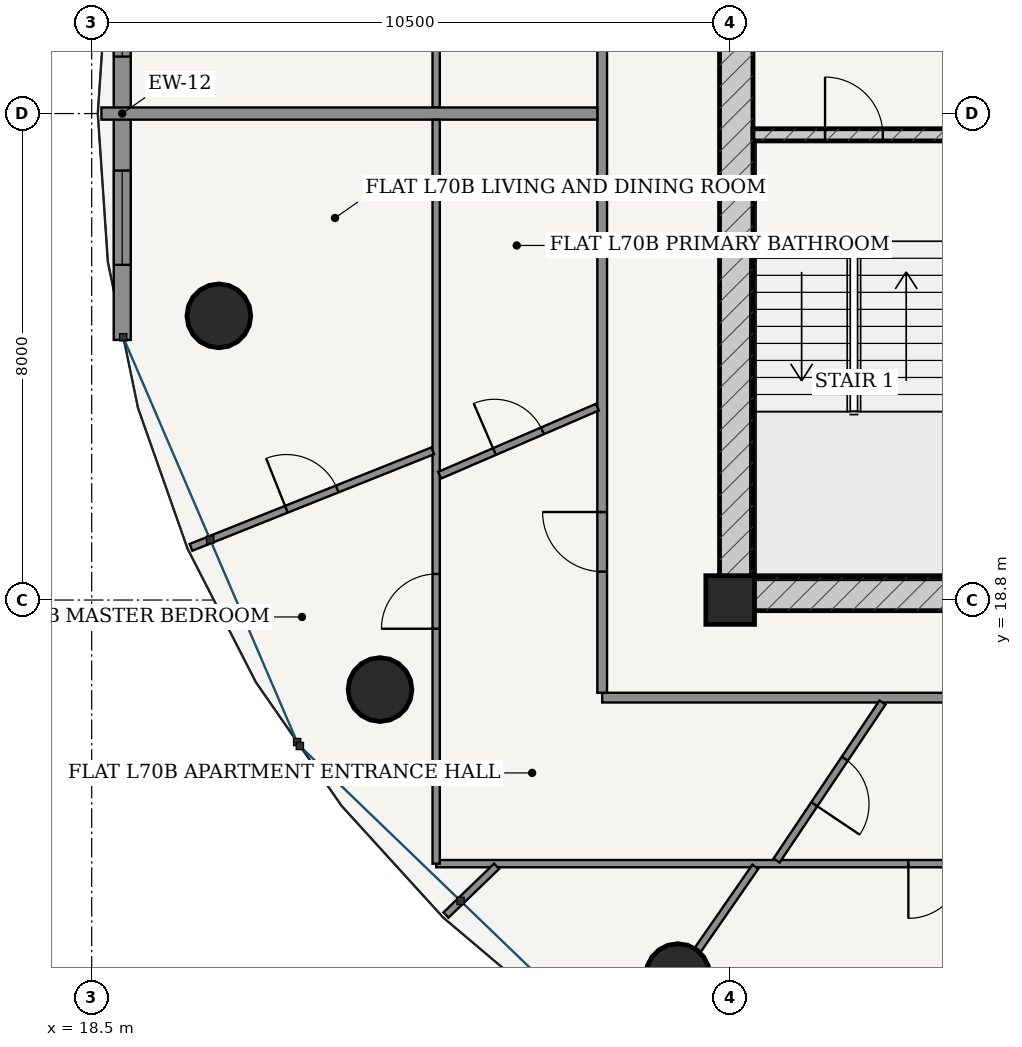
"""IFC4 building model, lengths in metres.
Left out: names, types, materials, properties, quantities, classifications, styles, units other than length and angle.
Written with IfcOpenShell. Run it as: python <this file> out.ifc"""

import sys

from ifc_helpers import new_model, si_unit, direction, frame, frame_2d, origin, origin_2d, place, context, subcontext, project, spatial, rectangle, hollow_circle, extrude, source, transform, mapped, element, fill, save


model = new_model("IFC4")
c1 = context("Model", 3, precision=1e-05, world=origin(), true_north=direction((-0.2419218956, 0.970295726276)))
c2 = subcontext(c1, "Body", "Model", "MODEL_VIEW")
j1 = project(units=[si_unit("LENGTHUNIT", "METRE"), si_unit("PLANEANGLEUNIT", "RADIAN")], contexts=[c1])
p1 = place(None, origin())
s1 = spatial("IfcSite", under=j1, at=p1, CompositionType="ELEMENT")
p2 = place(p1, origin())
s2 = spatial("IfcBuilding", under=s1, at=p2, CompositionType="ELEMENT")
p3 = place(p2, frame((0.0, 0.0, 266.95)))
s3 = spatial("IfcBuildingStorey", under=s2, at=p3, CompositionType="ELEMENT", Elevation=266.95)
p4 = place(p3, frame((29.0, 18.8, 0.0), z_axis=(0.0, 0.0, 1.0), x_axis=(1.0, 0.0, 0.0)))
e1 = element("IfcColumn", 1, at=p4, inside=s3, PredefinedType="COLUMN", context=c2, shape_type="SweptSolid", body=[
    extrude(rectangle(XDim=0.8, YDim=0.8, at=origin_2d()), origin(), (0.0, 0.0, 1.0), 3.75),
])
p5 = place(p3, frame((28.825, 18.9, 0.0), z_axis=(0.0, 0.0, 1.0), x_axis=(1.0, 0.0, 0.0)))
e2 = element("IfcWall", 2, at=p5, inside=s3, PredefinedType="SHEAR", context=c2, shape_type="SweptSolid", body=[
    extrude(rectangle(XDim=18.35, YDim=0.55, at=frame_2d((9.175, 0.0))), origin(), (0.0, 0.0, 1.0), 3.49),
])
p6 = place(p5, frame((8.75, 0.0, 0.0)))
e3 = element("IfcOpeningElement", 3, at=p6, cuts=e2, PredefinedType="OPENING", context=c2, shape_type="SweptSolid", body=[
    extrude(rectangle(XDim=0.85, YDim=2.1, at=frame_2d((0.425, 1.05))), frame((0.0, 0.285, 0.0), z_axis=(0.0, -1.0, 0.0), x_axis=(1.0, 0.0, 0.0)), (0.0, 0.0, 1.0), 0.57),
])
p7 = place(p3, frame((29.1, 19.175, 0.0), z_axis=(0.0, 0.0, 1.0), x_axis=(0.0, 1.0, 0.0)))
e4 = element("IfcWall", 4, at=p7, inside=s3, PredefinedType="SHEAR", context=c2, shape_type="SweptSolid", body=[
    extrude(rectangle(XDim=15.25, YDim=0.55, at=frame_2d((7.625, 0.0))), origin(), (0.0, 0.0, 1.0), 3.49),
])
p8 = place(p7, frame((9.875, 0.0, 0.0)))
e5 = element("IfcOpeningElement", 5, at=p8, cuts=e4, PredefinedType="OPENING", context=c2, shape_type="SweptSolid", body=[
    extrude(rectangle(XDim=1.5, YDim=2.2, at=frame_2d((0.75, 1.1))), frame((0.0, 0.285, 0.0), z_axis=(0.0, -1.0, 0.0), x_axis=(1.0, 0.0, 0.0)), (0.0, 0.0, 1.0), 0.57),
])
p9 = place(p3, frame((29.375, 26.45, 0.0), z_axis=(0.0, 0.0, 1.0), x_axis=(1.0, 0.0, 0.0)))
e6 = element("IfcWall", 6, at=p9, inside=s3, PredefinedType="SOLIDWALL", context=c2, shape_type="SweptSolid", body=[
    extrude(rectangle(XDim=3.32, YDim=0.2, at=frame_2d((1.66, 0.0))), origin(), (0.0, 0.0, 1.0), 3.49),
])
p10 = place(p9, frame((1.185, 0.0, 0.0)))
e7 = element("IfcOpeningElement", 7, at=p10, cuts=e6, PredefinedType="OPENING", context=c2, shape_type="SweptSolid", body=[
    extrude(rectangle(XDim=0.95, YDim=2.15, at=frame_2d((0.475, 1.075))), frame((0.0, 0.11, 0.0), z_axis=(0.0, -1.0, 0.0), x_axis=(1.0, 0.0, 0.0)), (0.0, 0.0, 1.0), 0.22),
])
for number, where, z_axis, x_axis in (
    (8, (20.591, 23.474, 0.0), (0.0, 0.0, 1.0), (1.0, 0.0, 0.0)),
    (9, (23.241, 17.328, 0.0), (0.0, 0.0, 1.0), (1.0, 0.0, 0.0)),
    (10, (28.139, 12.624, 0.0), (0.0, 0.0, 1.0), (1.0, 0.0, 0.0)),
):
    element("IfcColumn", number, at=place(p3, frame(where, z_axis=z_axis, x_axis=x_axis)), inside=s3, PredefinedType="COLUMN", context=c2, shape_type="SweptSolid", body=[
        extrude(hollow_circle(Radius=0.525, WallThickness=0.035, at=origin_2d()), origin(), (0.0, 0.0, 1.0), 3.75),
    ])
p11 = place(p3, frame((19.002, 30.522, 0.0), z_axis=(0.0, 0.0, 1.0), x_axis=(0.0, -1.0, 0.0)))
e11 = element("IfcWall", 11, at=p11, inside=s3, PredefinedType="SOLIDWALL", context=c2, shape_type="SweptSolid", body=[
    extrude(rectangle(XDim=7.445, YDim=0.28, at=frame_2d((3.722, 0.0))), origin(), (0.0, 0.0, 1.0), 3.49),
])
p12 = place(p11, frame((1.235, 0.0, 0.85)))
e12 = element("IfcOpeningElement", 12, at=p12, cuts=e11, PredefinedType="OPENING", context=c2, shape_type="SweptSolid", body=[
    extrude(rectangle(XDim=1.55, YDim=1.95, at=frame_2d((0.775, 0.975))), frame((0.0, 0.15, 0.0), z_axis=(0.0, -1.0, 0.0), x_axis=(1.0, 0.0, 0.0)), (0.0, 0.0, 1.0), 0.3),
])
p13 = place(p11, frame((4.66, 0.0, 0.85)))
e13 = element("IfcOpeningElement", 13, at=p13, cuts=e11, PredefinedType="OPENING", context=c2, shape_type="SweptSolid", body=[
    extrude(rectangle(XDim=1.55, YDim=1.95, at=frame_2d((0.775, 0.975))), frame((0.0, 0.15, 0.0), z_axis=(0.0, -1.0, 0.0), x_axis=(1.0, 0.0, 0.0)), (0.0, 0.0, 1.0), 0.3),
])
p14 = place(p3, frame((26.895, 17.195, 0.0), z_axis=(0.0, 0.0, 1.0), x_axis=(1.0, 0.0, 0.0)))
e14 = element("IfcWall", 14, at=p14, inside=s3, PredefinedType="PARTITIONING", context=c2, shape_type="SweptSolid", body=[
    extrude(rectangle(XDim=22.21, YDim=0.16, at=frame_2d((11.105, 0.0))), origin(), (0.0, 0.0, 1.0), 3.015),
])
p15 = place(p3, frame((26.895, 17.275, 0.0), z_axis=(0.0, 0.0, 1.0), x_axis=(0.0, 1.0, 0.0)))
e15 = element("IfcWall", 15, at=p15, inside=s3, PredefinedType="PARTITIONING", context=c2, shape_type="SweptSolid", body=[
    extrude(rectangle(XDim=13.925, YDim=0.16, at=frame_2d((6.962, 0.0))), origin(), (0.0, 0.0, 1.0), 3.015),
])
p16 = place(p15, frame((1.992, 0.0, 0.0)))
e16 = element("IfcOpeningElement", 16, at=p16, cuts=e15, PredefinedType="OPENING", context=c2, shape_type="SweptSolid", body=[
    extrude(rectangle(XDim=0.98, YDim=2.2, at=frame_2d((0.49, 1.1))), frame((0.0, 0.09, 0.0), z_axis=(0.0, -1.0, 0.0), x_axis=(1.0, 0.0, 0.0)), (0.0, 0.0, 1.0), 0.18),
])
p17 = place(p3, frame((24.165, 26.902, 0.0), z_axis=(0.0, 0.0, 1.0), x_axis=(0.0, 1.0, 0.0)))
e17 = element("IfcWall", 17, at=p17, inside=s3, PredefinedType="PARTITIONING", context=c2, shape_type="SweptSolid", body=[
    extrude(rectangle(XDim=7.108, YDim=0.12, at=frame_2d((3.554, 0.0))), origin(), (0.0, 0.0, 1.0), 3.015),
])
p18 = place(p3, frame((26.815, 26.8, 0.0), z_axis=(0.0, 0.0, 1.0), x_axis=(-1.0, 0.0, 0.0)))
e18 = element("IfcWall", 18, at=p18, inside=s3, PredefinedType="PARTITIONING", context=c2, shape_type="SweptSolid", body=[
    extrude(rectangle(XDim=8.155, YDim=0.2, at=frame_2d((4.078, 0.0))), origin(), (0.0, 0.0, 1.0), 3.121),
])
p19 = place(p3, frame((35.353, 14.465, 0.0), z_axis=(0.0, 0.0, 1.0), x_axis=(-1.0, 0.0, 0.0)))
e19 = element("IfcWall", 19, at=p19, inside=s3, PredefinedType="PARTITIONING", context=c2, shape_type="SweptSolid", body=[
    extrude(rectangle(XDim=11.188, YDim=0.12, at=frame_2d((5.594, 0.0))), origin(), (0.0, 0.0, 1.0), 3.015),
])
p20 = place(p19, frame((2.522, 0.0, 0.0)))
e20 = element("IfcOpeningElement", 20, at=p20, cuts=e19, PredefinedType="OPENING", context=c2, shape_type="SweptSolid", body=[
    extrude(rectangle(XDim=0.9, YDim=2.15, at=frame_2d((0.45, 1.075))), frame((0.0, 0.07, 0.0), z_axis=(0.0, -1.0, 0.0), x_axis=(1.0, 0.0, 0.0)), (0.0, 0.0, 1.0), 0.14),
])
p21 = place(p3, frame((24.165, 14.465, 0.0), z_axis=(0.0, 0.0, 1.0), x_axis=(0.0, 1.0, 0.0)))
e21 = element("IfcWall", 21, at=p21, inside=s3, PredefinedType="PARTITIONING", context=c2, shape_type="SweptSolid", body=[
    extrude(rectangle(XDim=12.233, YDim=0.12, at=frame_2d((6.116, 0.0))), origin(), (0.0, 0.0, 1.0), 3.015),
])
p22 = place(p21, frame((3.863, 0.0, 0.0)))
e22 = element("IfcOpeningElement", 22, at=p22, cuts=e21, PredefinedType="OPENING", context=c2, shape_type="SweptSolid", body=[
    extrude(rectangle(XDim=0.9, YDim=2.15, at=frame_2d((0.45, 1.075))), frame((0.0, 0.07, 0.0), z_axis=(0.0, -1.0, 0.0), x_axis=(1.0, 0.0, 0.0)), (0.0, 0.0, 1.0), 0.14),
])
p23 = place(p3, frame((24.107, 21.253, 0.0), z_axis=(0.0, 0.0, 1.0), x_axis=(-0.928712556691, -0.370800467966, 0.0)))
e23 = element("IfcWall", 23, at=p23, inside=s3, PredefinedType="PARTITIONING", context=c2, shape_type="SweptSolid", body=[
    extrude(rectangle(XDim=4.28, YDim=0.12, at=frame_2d((2.14, 0.0))), origin(), (0.0, 0.0, 1.0), 3.121),
])
p24 = place(p23, frame((1.69, 0.0, 0.0)))
e24 = element("IfcOpeningElement", 24, at=p24, cuts=e23, PredefinedType="OPENING", context=c2, shape_type="SweptSolid", body=[
    extrude(rectangle(XDim=0.9, YDim=2.15, at=frame_2d((0.45, 1.075))), frame((0.0, 0.07, 0.0), z_axis=(0.0, -1.0, 0.0), x_axis=(1.0, 0.0, 0.0)), (0.0, 0.0, 1.0), 0.14),
])
p25 = place(p3, frame((25.159, 14.422, 0.0), z_axis=(0.0, 0.0, 1.0), x_axis=(-0.720070222664, -0.693901199331, 0.0)))
e25 = element("IfcWall", 25, at=p25, inside=s3, PredefinedType="PARTITIONING", context=c2, shape_type="SweptSolid", body=[
    extrude(rectangle(XDim=1.157, YDim=0.12, at=frame_2d((0.578, 0.0))), origin(), (0.0, 0.0, 1.0), 3.49),
])
p26 = place(p3, frame((29.414, 14.414, 0.0), z_axis=(0.0, 0.0, 1.0), x_axis=(-0.569657021681, -0.821882520589, 0.0)))
e26 = element("IfcWall", 26, at=p26, inside=s3, PredefinedType="PARTITIONING", context=c2, shape_type="SweptSolid", body=[
    extrude(rectangle(XDim=3.748, YDim=0.12, at=frame_2d((1.874, 0.0))), origin(), (0.0, 0.0, 1.0), 3.015),
])
p27 = place(p3, frame((26.815, 21.972, 0.0), z_axis=(0.0, 0.0, 1.0), x_axis=(-0.918135987469, -0.396265452082, 0.0)))
e27 = element("IfcWall", 27, at=p27, inside=s3, PredefinedType="PARTITIONING", context=c2, shape_type="SweptSolid", body=[
    extrude(rectangle(XDim=2.824, YDim=0.12, at=frame_2d((1.412, 0.0))), origin(), (0.0, 0.0, 1.0), 3.209),
])
p28 = place(p27, frame((0.982, 0.0, 0.0)))
e28 = element("IfcOpeningElement", 28, at=p28, cuts=e27, PredefinedType="OPENING", context=c2, shape_type="SweptSolid", body=[
    extrude(rectangle(XDim=0.86, YDim=2.15, at=frame_2d((0.43, 1.075))), frame((0.0, 0.07, 0.0), z_axis=(0.0, -1.0, 0.0), x_axis=(1.0, 0.0, 0.0)), (0.0, 0.0, 1.0), 0.14),
])
p29 = place(p3, frame((31.505, 17.115, 0.0), z_axis=(0.0, 0.0, 1.0), x_axis=(-0.557003057019, -0.83051044212, 0.0)))
e29 = element("IfcWall", 29, at=p29, inside=s3, PredefinedType="PARTITIONING", context=c2, shape_type="SweptSolid", body=[
    extrude(rectangle(XDim=3.129, YDim=0.12, at=frame_2d((1.564, 0.0))), origin(), (0.0, 0.0, 1.0), 3.209),
])
p30 = place(p29, frame((1.114, 0.0, 0.0)))
e30 = element("IfcOpeningElement", 30, at=p30, cuts=e29, PredefinedType="OPENING", context=c2, shape_type="SweptSolid", body=[
    extrude(rectangle(XDim=0.9, YDim=2.15, at=frame_2d((0.45, 1.075))), frame((0.0, 0.07, 0.0), z_axis=(0.0, -1.0, 0.0), x_axis=(1.0, 0.0, 0.0)), (0.0, 0.0, 1.0), 0.14),
])
m1 = source(origin(), c2, "Body", "SweptSolid", [
    extrude(rectangle(XDim=1.55, YDim=1.95, at=frame_2d((0.775, 0.975))), frame((0.0, 0.03, 0.0), z_axis=(0.0, -1.0, 0.0), x_axis=(1.0, 0.0, 0.0)), (0.0, 0.0, 1.0), 0.06),
])
p31 = place(p12, origin())
e31 = element("IfcWindow", 31, at=p31, inside=s3, PartitioningType="SINGLE_PANEL", PredefinedType="WINDOW", context=c2, shape_type="MappedRepresentation", body=[
    mapped(m1, transform((0.0, 0.0, 0.0), scale=1.0)),
])
fill(e12, e31)
p32 = place(p13, origin())
e32 = element("IfcWindow", 32, at=p32, inside=s3, PartitioningType="SINGLE_PANEL", PredefinedType="WINDOW", context=c2, shape_type="MappedRepresentation", body=[
    mapped(m1, transform((0.0, 0.0, 0.0), scale=1.0)),
])
fill(e13, e32)
m2 = source(origin(), c2, "Body", "SweptSolid", [
    extrude(rectangle(XDim=0.95, YDim=2.15, at=frame_2d((0.475, 1.075))), frame((0.0, 0.025, 0.0), z_axis=(0.0, -1.0, 0.0), x_axis=(1.0, 0.0, 0.0)), (0.0, 0.0, 1.0), 0.05),
])
p33 = place(p10, origin())
e33 = element("IfcDoor", 33, at=p33, inside=s3, OperationType="SINGLE_SWING_LEFT", PredefinedType="DOOR", context=c2, shape_type="MappedRepresentation", body=[
    mapped(m2, transform((0.0, 0.0, 0.0), scale=1.0)),
])
fill(e7, e33)
m3 = source(origin(), c2, "Body", "SweptSolid", [
    extrude(rectangle(XDim=0.98, YDim=2.2, at=frame_2d((0.49, 1.1))), frame((0.0, 0.025, 0.0), z_axis=(0.0, -1.0, 0.0), x_axis=(1.0, 0.0, 0.0)), (0.0, 0.0, 1.0), 0.05),
])
p34 = place(p16, origin())
e34 = element("IfcDoor", 34, at=p34, inside=s3, OperationType="SINGLE_SWING_RIGHT", PredefinedType="DOOR", context=c2, shape_type="MappedRepresentation", body=[
    mapped(m3, transform((0.0, 0.0, 0.0), scale=1.0)),
])
fill(e16, e34)
m4 = source(origin(), c2, "Body", "SweptSolid", [
    extrude(rectangle(XDim=0.86, YDim=2.15, at=frame_2d((0.43, 1.075))), frame((0.0, 0.025, 0.0), z_axis=(0.0, -1.0, 0.0), x_axis=(1.0, 0.0, 0.0)), (0.0, 0.0, 1.0), 0.05),
])
p35 = place(p28, frame((0.86, 0.0, 0.0), z_axis=(0.0, 0.0, 1.0), x_axis=(-1.0, 0.0, 0.0)))
e35 = element("IfcDoor", 35, at=p35, inside=s3, OperationType="SINGLE_SWING_LEFT", PredefinedType="DOOR", context=c2, shape_type="MappedRepresentation", body=[
    mapped(m4, transform((0.0, 0.0, 0.0), scale=1.0)),
])
fill(e28, e35)
m5 = source(origin(), c2, "Body", "SweptSolid", [
    extrude(rectangle(XDim=0.9, YDim=2.15, at=frame_2d((0.45, 1.075))), frame((0.0, 0.025, 0.0), z_axis=(0.0, -1.0, 0.0), x_axis=(1.0, 0.0, 0.0)), (0.0, 0.0, 1.0), 0.05),
])
p36 = place(p30, origin())
e36 = element("IfcDoor", 36, at=p36, inside=s3, OperationType="SINGLE_SWING_RIGHT", PredefinedType="DOOR", context=c2, shape_type="MappedRepresentation", body=[
    mapped(m5, transform((0.0, 0.0, 0.0), scale=1.0)),
])
fill(e30, e36)
p37 = place(p22, origin())
e37 = element("IfcDoor", 37, at=p37, inside=s3, OperationType="SINGLE_SWING_LEFT", PredefinedType="DOOR", context=c2, shape_type="MappedRepresentation", body=[
    mapped(m5, transform((0.0, 0.0, 0.0), scale=1.0)),
])
fill(e22, e37)
p38 = place(p20, origin())
e38 = element("IfcDoor", 38, at=p38, inside=s3, OperationType="SINGLE_SWING_RIGHT", PredefinedType="DOOR", context=c2, shape_type="MappedRepresentation", body=[
    mapped(m5, transform((0.0, 0.0, 0.0), scale=1.0)),
])
fill(e20, e38)
p39 = place(p24, frame((0.9, 0.0, 0.0), z_axis=(0.0, 0.0, 1.0), x_axis=(-1.0, 0.0, 0.0)))
e39 = element("IfcDoor", 39, at=p39, inside=s3, OperationType="SINGLE_SWING_LEFT", PredefinedType="DOOR", context=c2, shape_type="MappedRepresentation", body=[
    mapped(m5, transform((0.0, 0.0, 0.0), scale=1.0)),
])
fill(e24, e39)
save(model, sys.argv[1])
